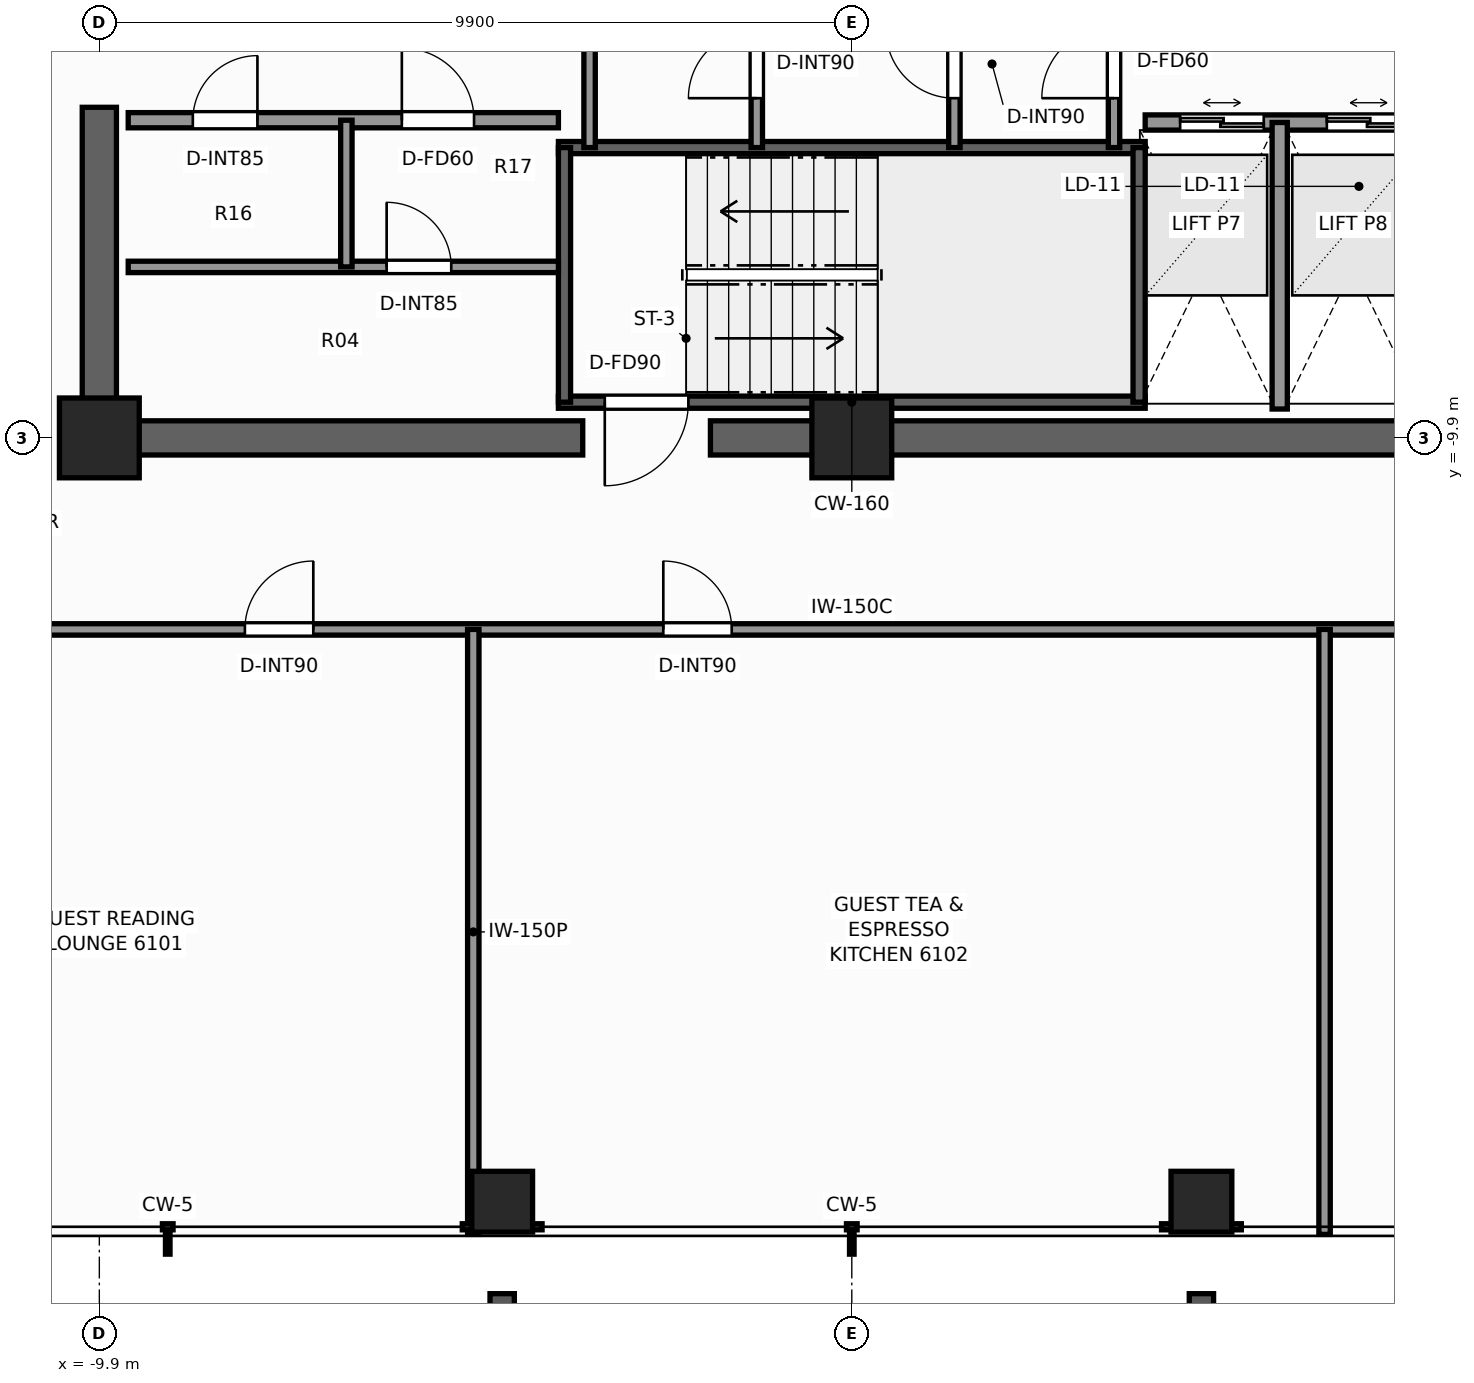
"""IFC4 building model, lengths in metres.
Left out: names, types, materials, properties, quantities, classifications, styles, units other than length and angle.
Written with IfcOpenShell. Run it as: python <this file> out.ifc"""

import sys

from ifc_helpers import new_model, si_unit, direction, frame, frame_2d, origin, origin_2d, place, context, subcontext, project, spatial, rectangle, extrude, element, fill, save


model = new_model("IFC4")
c1 = context("Model", 3, precision=1e-05, world=origin(), true_north=direction((0.0, 1.0)))
c2 = subcontext(c1, "Body", "Model", "MODEL_VIEW")
j1 = project(units=[si_unit("LENGTHUNIT", "METRE"), si_unit("PLANEANGLEUNIT", "RADIAN")], contexts=[c1])
p1 = place(None, origin())
s1 = spatial("IfcSite", under=j1, at=p1, CompositionType="ELEMENT")
p2 = place(p1, origin())
s2 = spatial("IfcBuilding", under=s1, at=p2, CompositionType="ELEMENT")
p3 = place(p2, frame((0.0, 0.0, 209.7)))
s3 = spatial("IfcBuildingStorey", under=s2, at=p3, CompositionType="ELEMENT", Elevation=209.7)
p4 = place(p3, frame((10.125, -9.9, 0.0), z_axis=(0.0, 0.0, 1.0), x_axis=(-1.0, 0.0, 0.0)))
e1 = element("IfcWall", 1, at=p4, inside=s3, PredefinedType="SHEAR", context=c2, shape_type="SweptSolid", body=[
    extrude(rectangle(XDim=11.985, YDim=0.45, at=frame_2d((5.993, 0.0))), origin(), (0.0, 0.0, 1.0), 3.3),
])
p5 = place(p3, frame((-3.54, -9.9, 0.0), z_axis=(0.0, 0.0, 1.0), x_axis=(-1.0, 0.0, 0.0)))
e2 = element("IfcWall", 2, at=p5, inside=s3, PredefinedType="SHEAR", context=c2, shape_type="SweptSolid", body=[
    extrude(rectangle(XDim=6.585, YDim=0.45, at=frame_2d((3.292, 0.0))), origin(), (0.0, 0.0, 1.0), 3.3),
])
p6 = place(p3, frame((-9.9, -9.675, 0.0), z_axis=(0.0, 0.0, 1.0), x_axis=(0.0, 1.0, 0.0)))
e3 = element("IfcWall", 3, at=p6, inside=s3, PredefinedType="SHEAR", context=c2, shape_type="SweptSolid", body=[
    extrude(rectangle(XDim=4.125, YDim=0.45, at=frame_2d((2.062, 0.0))), origin(), (0.0, 0.0, 1.0), 3.3),
])
for number, where, z_axis, x_axis in (
    (4, (-9.9, -9.9, 0.0), (0.0, 0.0, 1.0), (1.0, 0.0, 0.0)),
    (5, (0.0, -9.9, 0.0), (0.0, 0.0, 1.0), (1.0, 0.0, 0.0)),
):
    element("IfcColumn", number, at=place(p3, frame(where, z_axis=z_axis, x_axis=x_axis)), inside=s3, PredefinedType="COLUMN", context=c2, shape_type="SweptSolid", body=[
        extrude(rectangle(XDim=1.05, YDim=1.05, at=origin_2d()), origin(), (0.0, 0.0, 1.0), 3.3),
    ])
for number, where, z_axis, x_axis in (
    (6, (-4.6, -19.95, 0.0), (0.0, 0.0, 1.0), (1.0, 0.0, 0.0)),
    (7, (4.6, -19.95, 0.0), (0.0, 0.0, 1.0), (1.0, 0.0, 0.0)),
):
    element("IfcColumn", number, at=place(p3, frame(where, z_axis=z_axis, x_axis=x_axis)), inside=s3, PredefinedType="COLUMN", context=c2, shape_type="SweptSolid", body=[
        extrude(rectangle(XDim=0.8, YDim=0.8, at=origin_2d()), origin(), (0.0, 0.0, 1.0), 3.3),
    ])
p7 = place(p3, frame((3.86, -9.43, 0.0), z_axis=(0.0, 0.0, 1.0), x_axis=(-1.0, 0.0, 0.0)))
e8 = element("IfcWall", 8, at=p7, inside=s3, PredefinedType="SHEAR", context=c2, shape_type="SweptSolid", body=[
    extrude(rectangle(XDim=7.72, YDim=0.16, at=frame_2d((3.86, 0.0))), origin(), (0.0, 0.0, 1.0), 3.3),
])
p8 = place(p7, frame((6.01, 0.0, 0.0)))
e9 = element("IfcOpeningElement", 9, at=p8, cuts=e8, PredefinedType="OPENING", context=c2, shape_type="SweptSolid", body=[
    extrude(rectangle(XDim=1.1, YDim=2.2, at=frame_2d((0.55, 1.1))), frame((0.0, 0.09, 0.0), z_axis=(0.0, -1.0, 0.0), x_axis=(1.0, 0.0, 0.0)), (0.0, 0.0, 1.0), 0.18),
])
p9 = place(p3, frame((-3.86, -6.08, 0.0), z_axis=(0.0, 0.0, 1.0), x_axis=(1.0, 0.0, 0.0)))
e10 = element("IfcWall", 10, at=p9, inside=s3, PredefinedType="SHEAR", context=c2, shape_type="SweptSolid", body=[
    extrude(rectangle(XDim=7.72, YDim=0.16, at=frame_2d((3.86, 0.0))), origin(), (0.0, 0.0, 1.0), 3.3),
])
for number, where, z_axis, x_axis in (
    (11, (-3.78, -9.43, 0.0), (0.0, 0.0, 1.0), (0.0, 1.0, 0.0)),
    (12, (3.78, -9.43, 0.0), (0.0, 0.0, 1.0), (0.0, 1.0, 0.0)),
):
    element("IfcWall", number, at=place(p3, frame(where, z_axis=z_axis, x_axis=x_axis)), inside=s3, PredefinedType="SHEAR", context=c2, shape_type="SweptSolid", body=[
        extrude(rectangle(XDim=3.35, YDim=0.16, at=frame_2d((1.675, 0.0))), origin(), (0.0, 0.0, 1.0), 3.3),
    ])
p10 = place(p3, frame((-9.52, -5.72, 0.0), z_axis=(0.0, 0.0, 1.0), x_axis=(1.0, 0.0, 0.0)))
e13 = element("IfcWall", 13, at=p10, inside=s3, PredefinedType="SOLIDWALL", context=c2, shape_type="SweptSolid", body=[
    extrude(rectangle(XDim=5.66, YDim=0.2, at=frame_2d((2.83, 0.0))), origin(), (0.0, 0.0, 1.0), 3.08),
])
p11 = place(p10, frame((3.6, 0.0, 0.0)))
e14 = element("IfcOpeningElement", 14, at=p11, cuts=e13, PredefinedType="OPENING", context=c2, shape_type="SweptSolid", body=[
    extrude(rectangle(XDim=0.95, YDim=2.06, at=frame_2d((0.475, 1.03))), frame((0.0, 0.11, 0.0), z_axis=(0.0, -1.0, 0.0), x_axis=(1.0, 0.0, 0.0)), (0.0, 0.0, 1.0), 0.22),
])
p12 = place(p10, frame((0.85, 0.0, 0.0)))
e15 = element("IfcOpeningElement", 15, at=p12, cuts=e13, PredefinedType="OPENING", context=c2, shape_type="SweptSolid", body=[
    extrude(rectangle(XDim=0.85, YDim=2.03, at=frame_2d((0.425, 1.015))), frame((0.0, 0.11, 0.0), z_axis=(0.0, -1.0, 0.0), x_axis=(1.0, 0.0, 0.0)), (0.0, 0.0, 1.0), 0.22),
])
p13 = place(p3, frame((-9.52, -7.65, 0.0), z_axis=(0.0, 0.0, 1.0), x_axis=(1.0, 0.0, 0.0)))
e16 = element("IfcWall", 16, at=p13, inside=s3, PredefinedType="PARTITIONING", context=c2, shape_type="SweptSolid", body=[
    extrude(rectangle(XDim=5.66, YDim=0.15, at=frame_2d((2.83, 0.0))), origin(), (0.0, 0.0, 1.0), 3.08),
])
p14 = place(p13, frame((3.4, 0.0, 0.0)))
e17 = element("IfcOpeningElement", 17, at=p14, cuts=e16, PredefinedType="OPENING", context=c2, shape_type="SweptSolid", body=[
    extrude(rectangle(XDim=0.85, YDim=2.03, at=frame_2d((0.425, 1.015))), frame((0.0, 0.085, 0.0), z_axis=(0.0, -1.0, 0.0), x_axis=(1.0, 0.0, 0.0)), (0.0, 0.0, 1.0), 0.17),
])
p15 = place(p3, frame((-6.65, -7.65, 0.0), z_axis=(0.0, 0.0, 1.0), x_axis=(0.0, 1.0, 0.0)))
e18 = element("IfcWall", 18, at=p15, inside=s3, PredefinedType="PARTITIONING", context=c2, shape_type="SweptSolid", body=[
    extrude(rectangle(XDim=1.93, YDim=0.15, at=frame_2d((0.965, 0.0))), origin(), (0.0, 0.0, 1.0), 3.08),
])
p16 = place(p3, frame((3.86, -5.75, 0.0), z_axis=(0.0, 0.0, 1.0), x_axis=(1.0, 0.0, 0.0)))
e19 = element("IfcWall", 19, at=p16, inside=s3, PredefinedType="SOLIDWALL", context=c2, shape_type="SweptSolid", body=[
    extrude(rectangle(XDim=5.66, YDim=0.2, at=frame_2d((2.83, 0.0))), origin(), (0.0, 0.0, 1.0), 3.08),
])
p17 = place(p16, frame((0.46, 0.0, 0.0)))
e20 = element("IfcOpeningElement", 20, at=p17, cuts=e19, PredefinedType="OPENING", context=c2, shape_type="SweptSolid", body=[
    extrude(rectangle(XDim=1.1, YDim=2.2, at=frame_2d((0.55, 1.1))), frame((0.0, 0.11, 0.0), z_axis=(0.0, -1.0, 0.0), x_axis=(1.0, 0.0, 0.0)), (0.0, 0.0, 1.0), 0.22),
])
p18 = place(p16, frame((2.39, 0.0, 0.0)))
e21 = element("IfcOpeningElement", 21, at=p18, cuts=e19, PredefinedType="OPENING", context=c2, shape_type="SweptSolid", body=[
    extrude(rectangle(XDim=1.1, YDim=2.2, at=frame_2d((0.55, 1.1))), frame((0.0, 0.11, 0.0), z_axis=(0.0, -1.0, 0.0), x_axis=(1.0, 0.0, 0.0)), (0.0, 0.0, 1.0), 0.22),
])
p19 = place(p16, frame((4.32, 0.0, 0.0)))
e22 = element("IfcOpeningElement", 22, at=p19, cuts=e19, PredefinedType="OPENING", context=c2, shape_type="SweptSolid", body=[
    extrude(rectangle(XDim=1.1, YDim=2.2, at=frame_2d((0.55, 1.1))), frame((0.0, 0.11, 0.0), z_axis=(0.0, -1.0, 0.0), x_axis=(1.0, 0.0, 0.0)), (0.0, 0.0, 1.0), 0.22),
])
p20 = place(p3, frame((5.63, -9.52, 0.0), z_axis=(0.0, 0.0, 1.0), x_axis=(0.0, 1.0, 0.0)))
e23 = element("IfcWall", 23, at=p20, inside=s3, PredefinedType="SOLIDWALL", context=c2, shape_type="SweptSolid", body=[
    extrude(rectangle(XDim=3.77, YDim=0.2, at=frame_2d((1.885, 0.0))), origin(), (0.0, 0.0, 1.0), 3.08),
])
p21 = place(p3, frame((3.45, -6.08, 0.0), z_axis=(0.0, 0.0, 1.0), x_axis=(0.0, 1.0, 0.0)))
e24 = element("IfcWall", 24, at=p21, inside=s3, PredefinedType="PARTITIONING", context=c2, shape_type="SweptSolid", body=[
    extrude(rectangle(XDim=2.36, YDim=0.15, at=frame_2d((1.18, 0.0))), origin(), (0.0, 0.0, 1.0), 3.08),
])
p22 = place(p21, frame((0.65, 0.0, 0.0)))
e25 = element("IfcOpeningElement", 25, at=p22, cuts=e24, PredefinedType="OPENING", context=c2, shape_type="SweptSolid", body=[
    extrude(rectangle(XDim=0.95, YDim=2.06, at=frame_2d((0.475, 1.03))), frame((0.0, 0.085, 0.0), z_axis=(0.0, -1.0, 0.0), x_axis=(1.0, 0.0, 0.0)), (0.0, 0.0, 1.0), 0.17),
])
p23 = place(p3, frame((-3.45, -6.08, 0.0), z_axis=(0.0, 0.0, 1.0), x_axis=(0.0, 1.0, 0.0)))
e26 = element("IfcWall", 26, at=p23, inside=s3, PredefinedType="PARTITIONING", context=c2, shape_type="SweptSolid", body=[
    extrude(rectangle(XDim=2.36, YDim=0.15, at=frame_2d((1.18, 0.0))), origin(), (0.0, 0.0, 1.0), 3.08),
])
p24 = place(p3, frame((1.35, -6.08, 0.0), z_axis=(0.0, 0.0, 1.0), x_axis=(0.0, 1.0, 0.0)))
e27 = element("IfcWall", 27, at=p24, inside=s3, PredefinedType="PARTITIONING", context=c2, shape_type="SweptSolid", body=[
    extrude(rectangle(XDim=2.36, YDim=0.15, at=frame_2d((1.18, 0.0))), origin(), (0.0, 0.0, 1.0), 3.08),
])
p25 = place(p24, frame((0.65, 0.0, 0.0)))
e28 = element("IfcOpeningElement", 28, at=p25, cuts=e27, PredefinedType="OPENING", context=c2, shape_type="SweptSolid", body=[
    extrude(rectangle(XDim=0.9, YDim=2.06, at=frame_2d((0.45, 1.03))), frame((0.0, 0.085, 0.0), z_axis=(0.0, -1.0, 0.0), x_axis=(1.0, 0.0, 0.0)), (0.0, 0.0, 1.0), 0.17),
])
p26 = place(p3, frame((-1.25, -6.08, 0.0), z_axis=(0.0, 0.0, 1.0), x_axis=(0.0, 1.0, 0.0)))
e29 = element("IfcWall", 29, at=p26, inside=s3, PredefinedType="PARTITIONING", context=c2, shape_type="SweptSolid", body=[
    extrude(rectangle(XDim=2.36, YDim=0.15, at=frame_2d((1.18, 0.0))), origin(), (0.0, 0.0, 1.0), 3.08),
])
p27 = place(p26, frame((0.65, 0.0, 0.0)))
e30 = element("IfcOpeningElement", 30, at=p27, cuts=e29, PredefinedType="OPENING", context=c2, shape_type="SweptSolid", body=[
    extrude(rectangle(XDim=0.9, YDim=2.06, at=frame_2d((0.45, 1.03))), frame((0.0, 0.085, 0.0), z_axis=(0.0, -1.0, 0.0), x_axis=(1.0, 0.0, 0.0)), (0.0, 0.0, 1.0), 0.17),
])
p28 = place(p3, frame((-12.58, -12.42, 0.0), z_axis=(0.0, 0.0, 1.0), x_axis=(1.0, 0.0, 0.0)))
e31 = element("IfcWall", 31, at=p28, inside=s3, PredefinedType="PARTITIONING", context=c2, shape_type="SweptSolid", body=[
    extrude(rectangle(XDim=25.16, YDim=0.15, at=frame_2d((12.58, 0.0))), origin(), (0.0, 0.0, 1.0), 2.369),
])
p29 = place(p28, frame((4.595, 0.0, 0.0)))
e32 = element("IfcOpeningElement", 32, at=p29, cuts=e31, PredefinedType="OPENING", context=c2, shape_type="SweptSolid", body=[
    extrude(rectangle(XDim=0.9, YDim=2.06, at=frame_2d((0.45, 1.03))), frame((0.0, 0.085, 0.0), z_axis=(0.0, -1.0, 0.0), x_axis=(1.0, 0.0, 0.0)), (0.0, 0.0, 1.0), 0.17),
])
p30 = place(p28, frame((10.1, 0.0, 0.0)))
e33 = element("IfcOpeningElement", 33, at=p30, cuts=e31, PredefinedType="OPENING", context=c2, shape_type="SweptSolid", body=[
    extrude(rectangle(XDim=0.9, YDim=2.06, at=frame_2d((0.45, 1.03))), frame((0.0, 0.085, 0.0), z_axis=(0.0, -1.0, 0.0), x_axis=(1.0, 0.0, 0.0)), (0.0, 0.0, 1.0), 0.17),
])
p31 = place(p28, frame((20.079, 0.0, 0.0)))
e34 = element("IfcOpeningElement", 34, at=p31, cuts=e31, PredefinedType="OPENING", context=c2, shape_type="SweptSolid", body=[
    extrude(rectangle(XDim=0.9, YDim=2.06, at=frame_2d((0.45, 1.03))), frame((0.0, 0.085, 0.0), z_axis=(0.0, -1.0, 0.0), x_axis=(1.0, 0.0, 0.0)), (0.0, 0.0, 1.0), 0.17),
])
for number, where, z_axis, x_axis in (
    (35, (-4.98, -20.38, 0.0), (0.0, 0.0, 1.0), (0.0, 1.0, 0.0)),
    (36, (6.22, -20.38, 0.0), (0.0, 0.0, 1.0), (0.0, 1.0, 0.0)),
):
    element("IfcWall", number, at=place(p3, frame(where, z_axis=z_axis, x_axis=x_axis)), inside=s3, PredefinedType="PARTITIONING", context=c2, shape_type="SweptSolid", body=[
        extrude(rectangle(XDim=7.96, YDim=0.15, at=frame_2d((3.98, 0.0))), origin(), (0.0, 0.0, 1.0), 2.453),
    ])
p32 = place(p8, origin())
e37 = element("IfcDoor", 37, at=p32, inside=s3, OperationType="SINGLE_SWING_RIGHT", PredefinedType="DOOR", context=c2, shape_type="SweptSolid", body=[
    extrude(rectangle(XDim=1.1, YDim=2.2, at=frame_2d((0.55, 1.1))), frame((0.0, 0.025, 0.0), z_axis=(0.0, -1.0, 0.0), x_axis=(1.0, 0.0, 0.0)), (0.0, 0.0, 1.0), 0.05),
])
fill(e9, e37)
p33 = place(p11, origin())
e38 = element("IfcDoor", 38, at=p33, inside=s3, OperationType="SINGLE_SWING_LEFT", PredefinedType="DOOR", context=c2, shape_type="SweptSolid", body=[
    extrude(rectangle(XDim=0.95, YDim=2.06, at=frame_2d((0.475, 1.03))), frame((0.0, 0.025, 0.0), z_axis=(0.0, -1.0, 0.0), x_axis=(1.0, 0.0, 0.0)), (0.0, 0.0, 1.0), 0.05),
])
fill(e14, e38)
p34 = place(p12, origin())
e39 = element("IfcDoor", 39, at=p34, inside=s3, OperationType="SINGLE_SWING_RIGHT", PredefinedType="DOOR", context=c2, shape_type="SweptSolid", body=[
    extrude(rectangle(XDim=0.85, YDim=2.03, at=frame_2d((0.425, 1.015))), frame((0.0, 0.025, 0.0), z_axis=(0.0, -1.0, 0.0), x_axis=(1.0, 0.0, 0.0)), (0.0, 0.0, 1.0), 0.05),
])
fill(e15, e39)
p35 = place(p14, origin())
e40 = element("IfcDoor", 40, at=p35, inside=s3, OperationType="SINGLE_SWING_LEFT", PredefinedType="DOOR", context=c2, shape_type="SweptSolid", body=[
    extrude(rectangle(XDim=0.85, YDim=2.03, at=frame_2d((0.425, 1.015))), frame((0.0, 0.025, 0.0), z_axis=(0.0, -1.0, 0.0), x_axis=(1.0, 0.0, 0.0)), (0.0, 0.0, 1.0), 0.05),
])
fill(e17, e40)
p36 = place(p17, origin())
e41 = element("IfcDoor", 41, at=p36, inside=s3, OperationType="DOUBLE_DOOR_SLIDING", PredefinedType="DOOR", context=c2, shape_type="SweptSolid", body=[
    extrude(rectangle(XDim=1.1, YDim=2.2, at=frame_2d((0.55, 1.1))), frame((0.0, 0.025, 0.0), z_axis=(0.0, -1.0, 0.0), x_axis=(1.0, 0.0, 0.0)), (0.0, 0.0, 1.0), 0.05),
])
fill(e20, e41)
p37 = place(p18, origin())
e42 = element("IfcDoor", 42, at=p37, inside=s3, OperationType="DOUBLE_DOOR_SLIDING", PredefinedType="DOOR", context=c2, shape_type="SweptSolid", body=[
    extrude(rectangle(XDim=1.1, YDim=2.2, at=frame_2d((0.55, 1.1))), frame((0.0, 0.025, 0.0), z_axis=(0.0, -1.0, 0.0), x_axis=(1.0, 0.0, 0.0)), (0.0, 0.0, 1.0), 0.05),
])
fill(e21, e42)
p38 = place(p22, origin())
e43 = element("IfcDoor", 43, at=p38, inside=s3, OperationType="SINGLE_SWING_LEFT", PredefinedType="DOOR", context=c2, shape_type="SweptSolid", body=[
    extrude(rectangle(XDim=0.95, YDim=2.06, at=frame_2d((0.475, 1.03))), frame((0.0, 0.025, 0.0), z_axis=(0.0, -1.0, 0.0), x_axis=(1.0, 0.0, 0.0)), (0.0, 0.0, 1.0), 0.05),
])
fill(e25, e43)
p39 = place(p25, origin())
e44 = element("IfcDoor", 44, at=p39, inside=s3, OperationType="SINGLE_SWING_RIGHT", PredefinedType="DOOR", context=c2, shape_type="SweptSolid", body=[
    extrude(rectangle(XDim=0.9, YDim=2.06, at=frame_2d((0.45, 1.03))), frame((0.0, 0.025, 0.0), z_axis=(0.0, -1.0, 0.0), x_axis=(1.0, 0.0, 0.0)), (0.0, 0.0, 1.0), 0.05),
])
fill(e28, e44)
p40 = place(p27, origin())
e45 = element("IfcDoor", 45, at=p40, inside=s3, OperationType="SINGLE_SWING_LEFT", PredefinedType="DOOR", context=c2, shape_type="SweptSolid", body=[
    extrude(rectangle(XDim=0.9, YDim=2.06, at=frame_2d((0.45, 1.03))), frame((0.0, 0.025, 0.0), z_axis=(0.0, -1.0, 0.0), x_axis=(1.0, 0.0, 0.0)), (0.0, 0.0, 1.0), 0.05),
])
fill(e30, e45)
p41 = place(p29, origin())
e46 = element("IfcDoor", 46, at=p41, inside=s3, OperationType="SINGLE_SWING_RIGHT", PredefinedType="DOOR", context=c2, shape_type="SweptSolid", body=[
    extrude(rectangle(XDim=0.9, YDim=2.06, at=frame_2d((0.45, 1.03))), frame((0.0, 0.025, 0.0), z_axis=(0.0, -1.0, 0.0), x_axis=(1.0, 0.0, 0.0)), (0.0, 0.0, 1.0), 0.05),
])
fill(e32, e46)
p42 = place(p30, origin())
e47 = element("IfcDoor", 47, at=p42, inside=s3, OperationType="SINGLE_SWING_LEFT", PredefinedType="DOOR", context=c2, shape_type="SweptSolid", body=[
    extrude(rectangle(XDim=0.9, YDim=2.06, at=frame_2d((0.45, 1.03))), frame((0.0, 0.025, 0.0), z_axis=(0.0, -1.0, 0.0), x_axis=(1.0, 0.0, 0.0)), (0.0, 0.0, 1.0), 0.05),
])
fill(e33, e47)
save(model, sys.argv[1])
